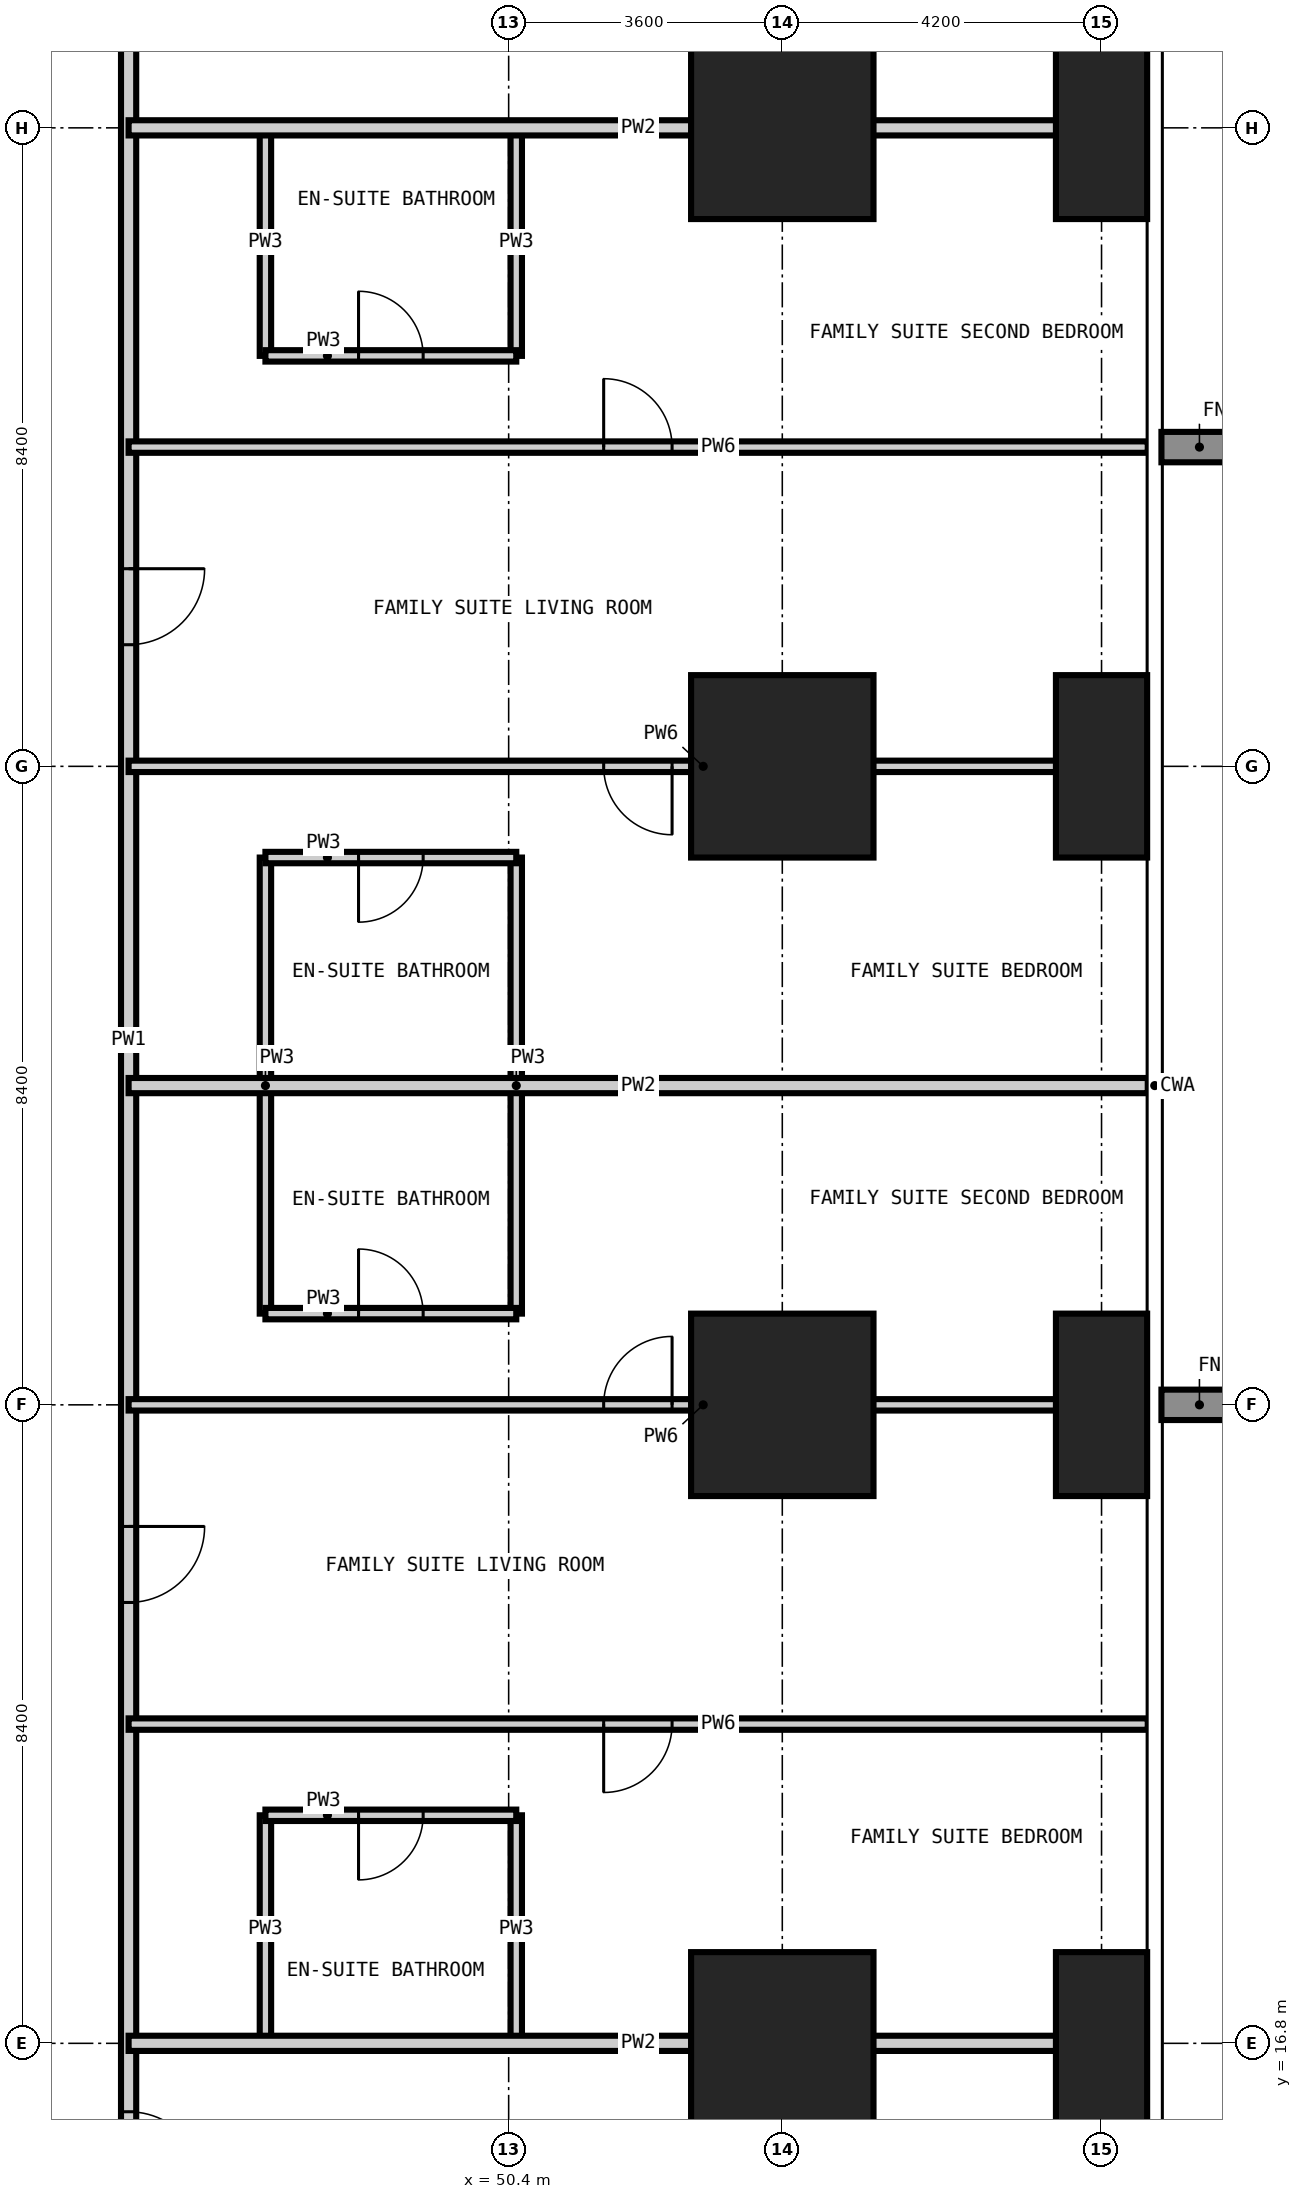
"""IFC4 building model, lengths in metres.
Left out: names, types, materials, properties, quantities, classifications, styles, units other than length and angle.
Written with IfcOpenShell. Run it as: python <this file> out.ifc"""

import sys

from ifc_helpers import new_model, si_unit, direction, frame, frame_2d, origin, origin_2d, place, context, subcontext, project, spatial, rectangle, extrude, element, fill, save


model = new_model("IFC4")
c1 = context("Model", 3, precision=1e-05, world=origin(), true_north=direction((0.0, 1.0)))
c2 = subcontext(c1, "Body", "Model", "MODEL_VIEW")
j1 = project(units=[si_unit("LENGTHUNIT", "METRE"), si_unit("PLANEANGLEUNIT", "RADIAN")], contexts=[c1])
p1 = place(None, origin())
s1 = spatial("IfcSite", under=j1, at=p1, CompositionType="ELEMENT")
p2 = place(p1, origin())
s2 = spatial("IfcBuilding", under=s1, at=p2, CompositionType="ELEMENT")
p3 = place(p2, frame((0.0, 0.0, 81.0)))
s3 = spatial("IfcBuildingStorey", under=s2, at=p3, CompositionType="ELEMENT", Elevation=81.0)
for number, where, z_axis, x_axis in (
    (1, (54.0, 16.8, -0.35), (0.0, 0.0, 1.0), (1.0, 0.0, 0.0)),
    (2, (54.0, 25.2, -0.35), (0.0, 0.0, 1.0), (1.0, 0.0, 0.0)),
    (3, (54.0, 33.6, -0.35), (0.0, 0.0, 1.0), (1.0, 0.0, 0.0)),
    (4, (54.0, 42.0, -0.35), (0.0, 0.0, 1.0), (1.0, 0.0, 0.0)),
):
    element("IfcColumn", number, at=place(p3, frame(where, z_axis=z_axis, x_axis=x_axis)), inside=s3, PredefinedType="COLUMN", context=c2, shape_type="SweptSolid", body=[
        extrude(rectangle(XDim=2.4, YDim=2.4, at=origin_2d()), origin(), (0.0, 0.0, 1.0), 3.6),
    ])
for number, where, z_axis, x_axis in (
    (5, (58.2, 16.8, -0.35), (0.0, 0.0, 1.0), (1.0, 0.0, 0.0)),
    (6, (58.2, 25.2, -0.35), (0.0, 0.0, 1.0), (1.0, 0.0, 0.0)),
    (7, (58.2, 33.6, -0.35), (0.0, 0.0, 1.0), (1.0, 0.0, 0.0)),
    (8, (58.2, 42.0, -0.35), (0.0, 0.0, 1.0), (1.0, 0.0, 0.0)),
):
    element("IfcColumn", number, at=place(p3, frame(where, z_axis=z_axis, x_axis=x_axis)), inside=s3, PredefinedType="COLUMN", context=c2, shape_type="SweptSolid", body=[
        extrude(rectangle(XDim=1.2, YDim=2.4, at=origin_2d()), origin(), (0.0, 0.0, 1.0), 3.6),
    ])
p4 = place(p3, frame((47.2, 16.8, 0.0), z_axis=(0.0, 0.0, 1.0), x_axis=(0.0, 1.0, 0.0)))
e9 = element("IfcWall", 9, at=p4, inside=s3, PredefinedType="PARTITIONING", context=c2, shape_type="SweptSolid", body=[
    extrude(rectangle(XDim=3.0, YDim=0.15, at=frame_2d((1.5, 0.0))), origin(), (0.0, 0.0, 1.0), 3.25),
])
p5 = place(p3, frame((47.2, 26.4, 0.0), z_axis=(0.0, 0.0, 1.0), x_axis=(0.0, 1.0, 0.0)))
e10 = element("IfcWall", 10, at=p5, inside=s3, PredefinedType="PARTITIONING", context=c2, shape_type="SweptSolid", body=[
    extrude(rectangle(XDim=6.0, YDim=0.15, at=frame_2d((3.0, 0.0))), origin(), (0.0, 0.0, 1.0), 3.25),
])
for number, where, z_axis, x_axis in (
    (11, (47.2, 39.0, 0.0), (0.0, 0.0, 1.0), (0.0, 1.0, 0.0)),
    (12, (50.5, 16.8, 0.0), (0.0, 0.0, 1.0), (0.0, 1.0, 0.0)),
):
    element("IfcWall", number, at=place(p3, frame(where, z_axis=z_axis, x_axis=x_axis)), inside=s3, PredefinedType="PARTITIONING", context=c2, shape_type="SweptSolid", body=[
        extrude(rectangle(XDim=3.0, YDim=0.15, at=frame_2d((1.5, 0.0))), origin(), (0.0, 0.0, 1.0), 3.25),
    ])
p6 = place(p3, frame((50.5, 26.4, 0.0), z_axis=(0.0, 0.0, 1.0), x_axis=(0.0, 1.0, 0.0)))
e13 = element("IfcWall", 13, at=p6, inside=s3, PredefinedType="PARTITIONING", context=c2, shape_type="SweptSolid", body=[
    extrude(rectangle(XDim=6.0, YDim=0.15, at=frame_2d((3.0, 0.0))), origin(), (0.0, 0.0, 1.0), 3.25),
])
p7 = place(p3, frame((50.5, 39.0, 0.0), z_axis=(0.0, 0.0, 1.0), x_axis=(0.0, 1.0, 0.0)))
e14 = element("IfcWall", 14, at=p7, inside=s3, PredefinedType="PARTITIONING", context=c2, shape_type="SweptSolid", body=[
    extrude(rectangle(XDim=3.0, YDim=0.15, at=frame_2d((1.5, 0.0))), origin(), (0.0, 0.0, 1.0), 3.25),
])
p8 = place(p3, frame((47.2, 19.8, 0.0), z_axis=(0.0, 0.0, 1.0), x_axis=(1.0, 0.0, 0.0)))
e15 = element("IfcWall", 15, at=p8, inside=s3, PredefinedType="PARTITIONING", context=c2, shape_type="SweptSolid", body=[
    extrude(rectangle(XDim=3.3, YDim=0.15, at=frame_2d((1.65, 0.0))), origin(), (0.0, 0.0, 1.0), 3.25),
])
p9 = place(p8, frame((1.225, 0.0, 0.0)))
e16 = element("IfcOpeningElement", 16, at=p9, cuts=e15, PredefinedType="OPENING", context=c2, shape_type="SweptSolid", body=[
    extrude(rectangle(XDim=0.85, YDim=2.1, at=frame_2d((0.425, 1.05))), frame((0.0, 0.085, 0.0), z_axis=(0.0, -1.0, 0.0), x_axis=(1.0, 0.0, 0.0)), (0.0, 0.0, 1.0), 0.17),
])
p10 = place(p3, frame((47.2, 26.4, 0.0), z_axis=(0.0, 0.0, 1.0), x_axis=(1.0, 0.0, 0.0)))
e17 = element("IfcWall", 17, at=p10, inside=s3, PredefinedType="PARTITIONING", context=c2, shape_type="SweptSolid", body=[
    extrude(rectangle(XDim=3.3, YDim=0.15, at=frame_2d((1.65, 0.0))), origin(), (0.0, 0.0, 1.0), 3.25),
])
p11 = place(p10, frame((1.225, 0.0, 0.0)))
e18 = element("IfcOpeningElement", 18, at=p11, cuts=e17, PredefinedType="OPENING", context=c2, shape_type="SweptSolid", body=[
    extrude(rectangle(XDim=0.85, YDim=2.1, at=frame_2d((0.425, 1.05))), frame((0.0, 0.085, 0.0), z_axis=(0.0, -1.0, 0.0), x_axis=(1.0, 0.0, 0.0)), (0.0, 0.0, 1.0), 0.17),
])
p12 = place(p3, frame((47.2, 32.4, 0.0), z_axis=(0.0, 0.0, 1.0), x_axis=(1.0, 0.0, 0.0)))
e19 = element("IfcWall", 19, at=p12, inside=s3, PredefinedType="PARTITIONING", context=c2, shape_type="SweptSolid", body=[
    extrude(rectangle(XDim=3.3, YDim=0.15, at=frame_2d((1.65, 0.0))), origin(), (0.0, 0.0, 1.0), 3.25),
])
p13 = place(p12, frame((1.225, 0.0, 0.0)))
e20 = element("IfcOpeningElement", 20, at=p13, cuts=e19, PredefinedType="OPENING", context=c2, shape_type="SweptSolid", body=[
    extrude(rectangle(XDim=0.85, YDim=2.1, at=frame_2d((0.425, 1.05))), frame((0.0, 0.085, 0.0), z_axis=(0.0, -1.0, 0.0), x_axis=(1.0, 0.0, 0.0)), (0.0, 0.0, 1.0), 0.17),
])
p14 = place(p3, frame((47.2, 39.0, 0.0), z_axis=(0.0, 0.0, 1.0), x_axis=(1.0, 0.0, 0.0)))
e21 = element("IfcWall", 21, at=p14, inside=s3, PredefinedType="PARTITIONING", context=c2, shape_type="SweptSolid", body=[
    extrude(rectangle(XDim=3.3, YDim=0.15, at=frame_2d((1.65, 0.0))), origin(), (0.0, 0.0, 1.0), 3.25),
])
p15 = place(p14, frame((1.225, 0.0, 0.0)))
e22 = element("IfcOpeningElement", 22, at=p15, cuts=e21, PredefinedType="OPENING", context=c2, shape_type="SweptSolid", body=[
    extrude(rectangle(XDim=0.85, YDim=2.1, at=frame_2d((0.425, 1.05))), frame((0.0, 0.085, 0.0), z_axis=(0.0, -1.0, 0.0), x_axis=(1.0, 0.0, 0.0)), (0.0, 0.0, 1.0), 0.17),
])
p16 = place(p3, frame((45.4, 46.0, 0.0), z_axis=(0.0, 0.0, 1.0), x_axis=(0.0, -1.0, 0.0)))
e23 = element("IfcWall", 23, at=p16, inside=s3, PredefinedType="PARTITIONING", context=c2, shape_type="SweptSolid", body=[
    extrude(rectangle(XDim=32.0, YDim=0.2, at=frame_2d((16.0, 0.0))), origin(), (0.0, 0.0, 1.0), 3.25),
])
p17 = place(p16, frame((22.4, 0.0, 0.0)))
e24 = element("IfcOpeningElement", 24, at=p17, cuts=e23, PredefinedType="OPENING", context=c2, shape_type="SweptSolid", body=[
    extrude(rectangle(XDim=1.0, YDim=2.2, at=frame_2d((0.5, 1.1))), frame((0.0, 0.11, 0.0), z_axis=(0.0, -1.0, 0.0), x_axis=(1.0, 0.0, 0.0)), (0.0, 0.0, 1.0), 0.22),
])
p18 = place(p16, frame((9.8, 0.0, 0.0)))
e25 = element("IfcOpeningElement", 25, at=p18, cuts=e23, PredefinedType="OPENING", context=c2, shape_type="SweptSolid", body=[
    extrude(rectangle(XDim=1.0, YDim=2.2, at=frame_2d((0.5, 1.1))), frame((0.0, 0.11, 0.0), z_axis=(0.0, -1.0, 0.0), x_axis=(1.0, 0.0, 0.0)), (0.0, 0.0, 1.0), 0.22),
])
p19 = place(p16, frame((30.1, 0.0, 0.0)))
e26 = element("IfcOpeningElement", 26, at=p19, cuts=e23, PredefinedType="OPENING", context=c2, shape_type="SweptSolid", body=[
    extrude(rectangle(XDim=1.0, YDim=2.2, at=frame_2d((0.5, 1.1))), frame((0.0, 0.11, 0.0), z_axis=(0.0, -1.0, 0.0), x_axis=(1.0, 0.0, 0.0)), (0.0, 0.0, 1.0), 0.22),
])
p20 = place(p16, frame((1.5, 0.0, 0.0)))
e27 = element("IfcOpeningElement", 27, at=p20, cuts=e23, PredefinedType="OPENING", context=c2, shape_type="SweptSolid", body=[
    extrude(rectangle(XDim=1.0, YDim=2.2, at=frame_2d((0.5, 1.1))), frame((0.0, 0.11, 0.0), z_axis=(0.0, -1.0, 0.0), x_axis=(1.0, 0.0, 0.0)), (0.0, 0.0, 1.0), 0.22),
])
for number, where, z_axis, x_axis in (
    (28, (45.4, 16.8, 0.0), (0.0, 0.0, 1.0), (1.0, 0.0, 0.0)),
    (29, (45.4, 29.4, 0.0), (0.0, 0.0, 1.0), (1.0, 0.0, 0.0)),
    (30, (45.4, 42.0, 0.0), (0.0, 0.0, 1.0), (1.0, 0.0, 0.0)),
):
    element("IfcWall", number, at=place(p3, frame(where, z_axis=z_axis, x_axis=x_axis)), inside=s3, PredefinedType="PARTITIONING", context=c2, shape_type="SweptSolid", body=[
        extrude(rectangle(XDim=13.408, YDim=0.2, at=frame_2d((6.704, 0.0))), origin(), (0.0, 0.0, 1.0), 3.25),
    ])
p21 = place(p3, frame((45.4, 21.0, 0.0), z_axis=(0.0, 0.0, 1.0), x_axis=(1.0, 0.0, 0.0)))
e31 = element("IfcWall", 31, at=p21, inside=s3, PredefinedType="PARTITIONING", context=c2, shape_type="SweptSolid", body=[
    extrude(rectangle(XDim=13.408, YDim=0.15, at=frame_2d((6.704, 0.0))), origin(), (0.0, 0.0, 1.0), 3.25),
])
p22 = place(p21, frame((6.25, 0.0, 0.0)))
e32 = element("IfcOpeningElement", 32, at=p22, cuts=e31, PredefinedType="OPENING", context=c2, shape_type="SweptSolid", body=[
    extrude(rectangle(XDim=0.9, YDim=2.1, at=frame_2d((0.45, 1.05))), frame((0.0, 0.085, 0.0), z_axis=(0.0, -1.0, 0.0), x_axis=(1.0, 0.0, 0.0)), (0.0, 0.0, 1.0), 0.17),
])
p23 = place(p3, frame((45.4, 25.2, 0.0), z_axis=(0.0, 0.0, 1.0), x_axis=(1.0, 0.0, 0.0)))
e33 = element("IfcWall", 33, at=p23, inside=s3, PredefinedType="PARTITIONING", context=c2, shape_type="SweptSolid", body=[
    extrude(rectangle(XDim=13.408, YDim=0.15, at=frame_2d((6.704, 0.0))), origin(), (0.0, 0.0, 1.0), 3.25),
])
p24 = place(p23, frame((6.25, 0.0, 0.0)))
e34 = element("IfcOpeningElement", 34, at=p24, cuts=e33, PredefinedType="OPENING", context=c2, shape_type="SweptSolid", body=[
    extrude(rectangle(XDim=0.9, YDim=2.1, at=frame_2d((0.45, 1.05))), frame((0.0, 0.085, 0.0), z_axis=(0.0, -1.0, 0.0), x_axis=(1.0, 0.0, 0.0)), (0.0, 0.0, 1.0), 0.17),
])
p25 = place(p3, frame((45.4, 33.6, 0.0), z_axis=(0.0, 0.0, 1.0), x_axis=(1.0, 0.0, 0.0)))
e35 = element("IfcWall", 35, at=p25, inside=s3, PredefinedType="PARTITIONING", context=c2, shape_type="SweptSolid", body=[
    extrude(rectangle(XDim=13.408, YDim=0.15, at=frame_2d((6.704, 0.0))), origin(), (0.0, 0.0, 1.0), 3.25),
])
p26 = place(p25, frame((6.25, 0.0, 0.0)))
e36 = element("IfcOpeningElement", 36, at=p26, cuts=e35, PredefinedType="OPENING", context=c2, shape_type="SweptSolid", body=[
    extrude(rectangle(XDim=0.9, YDim=2.1, at=frame_2d((0.45, 1.05))), frame((0.0, 0.085, 0.0), z_axis=(0.0, -1.0, 0.0), x_axis=(1.0, 0.0, 0.0)), (0.0, 0.0, 1.0), 0.17),
])
p27 = place(p3, frame((45.4, 37.8, 0.0), z_axis=(0.0, 0.0, 1.0), x_axis=(1.0, 0.0, 0.0)))
e37 = element("IfcWall", 37, at=p27, inside=s3, PredefinedType="PARTITIONING", context=c2, shape_type="SweptSolid", body=[
    extrude(rectangle(XDim=13.408, YDim=0.15, at=frame_2d((6.704, 0.0))), origin(), (0.0, 0.0, 1.0), 3.25),
])
p28 = place(p27, frame((6.25, 0.0, 0.0)))
e38 = element("IfcOpeningElement", 38, at=p28, cuts=e37, PredefinedType="OPENING", context=c2, shape_type="SweptSolid", body=[
    extrude(rectangle(XDim=0.9, YDim=2.1, at=frame_2d((0.45, 1.05))), frame((0.0, 0.085, 0.0), z_axis=(0.0, -1.0, 0.0), x_axis=(1.0, 0.0, 0.0)), (0.0, 0.0, 1.0), 0.17),
])
p29 = place(p17, origin())
e39 = element("IfcDoor", 39, at=p29, inside=s3, OperationType="SINGLE_SWING_LEFT", PredefinedType="DOOR", context=c2, shape_type="SweptSolid", body=[
    extrude(rectangle(XDim=1.0, YDim=2.2, at=frame_2d((0.5, 1.1))), frame((0.0, 0.025, 0.0), z_axis=(0.0, -1.0, 0.0), x_axis=(1.0, 0.0, 0.0)), (0.0, 0.0, 1.0), 0.05),
])
fill(e24, e39)
p30 = place(p22, frame((0.9, 0.0, 0.0), z_axis=(0.0, 0.0, 1.0), x_axis=(-1.0, 0.0, 0.0)))
e40 = element("IfcDoor", 40, at=p30, inside=s3, OperationType="SINGLE_SWING_RIGHT", PredefinedType="DOOR", context=c2, shape_type="SweptSolid", body=[
    extrude(rectangle(XDim=0.9, YDim=2.1, at=frame_2d((0.45, 1.05))), frame((0.0, 0.025, 0.0), z_axis=(0.0, -1.0, 0.0), x_axis=(1.0, 0.0, 0.0)), (0.0, 0.0, 1.0), 0.05),
])
fill(e32, e40)
p31 = place(p9, frame((0.85, 0.0, 0.0), z_axis=(0.0, 0.0, 1.0), x_axis=(-1.0, 0.0, 0.0)))
e41 = element("IfcDoor", 41, at=p31, inside=s3, OperationType="SINGLE_SWING_RIGHT", PredefinedType="DOOR", context=c2, shape_type="SweptSolid", body=[
    extrude(rectangle(XDim=0.85, YDim=2.1, at=frame_2d((0.425, 1.05))), frame((0.0, 0.025, 0.0), z_axis=(0.0, -1.0, 0.0), x_axis=(1.0, 0.0, 0.0)), (0.0, 0.0, 1.0), 0.05),
])
fill(e16, e41)
p32 = place(p24, origin())
e42 = element("IfcDoor", 42, at=p32, inside=s3, OperationType="SINGLE_SWING_RIGHT", PredefinedType="DOOR", context=c2, shape_type="SweptSolid", body=[
    extrude(rectangle(XDim=0.9, YDim=2.1, at=frame_2d((0.45, 1.05))), frame((0.0, 0.025, 0.0), z_axis=(0.0, -1.0, 0.0), x_axis=(1.0, 0.0, 0.0)), (0.0, 0.0, 1.0), 0.05),
])
fill(e34, e42)
p33 = place(p11, origin())
e43 = element("IfcDoor", 43, at=p33, inside=s3, OperationType="SINGLE_SWING_LEFT", PredefinedType="DOOR", context=c2, shape_type="SweptSolid", body=[
    extrude(rectangle(XDim=0.85, YDim=2.1, at=frame_2d((0.425, 1.05))), frame((0.0, 0.025, 0.0), z_axis=(0.0, -1.0, 0.0), x_axis=(1.0, 0.0, 0.0)), (0.0, 0.0, 1.0), 0.05),
])
fill(e18, e43)
p34 = place(p18, origin())
e44 = element("IfcDoor", 44, at=p34, inside=s3, OperationType="SINGLE_SWING_LEFT", PredefinedType="DOOR", context=c2, shape_type="SweptSolid", body=[
    extrude(rectangle(XDim=1.0, YDim=2.2, at=frame_2d((0.5, 1.1))), frame((0.0, 0.025, 0.0), z_axis=(0.0, -1.0, 0.0), x_axis=(1.0, 0.0, 0.0)), (0.0, 0.0, 1.0), 0.05),
])
fill(e25, e44)
p35 = place(p26, frame((0.9, 0.0, 0.0), z_axis=(0.0, 0.0, 1.0), x_axis=(-1.0, 0.0, 0.0)))
e45 = element("IfcDoor", 45, at=p35, inside=s3, OperationType="SINGLE_SWING_LEFT", PredefinedType="DOOR", context=c2, shape_type="SweptSolid", body=[
    extrude(rectangle(XDim=0.9, YDim=2.1, at=frame_2d((0.45, 1.05))), frame((0.0, 0.025, 0.0), z_axis=(0.0, -1.0, 0.0), x_axis=(1.0, 0.0, 0.0)), (0.0, 0.0, 1.0), 0.05),
])
fill(e36, e45)
p36 = place(p13, frame((0.85, 0.0, 0.0), z_axis=(0.0, 0.0, 1.0), x_axis=(-1.0, 0.0, 0.0)))
e46 = element("IfcDoor", 46, at=p36, inside=s3, OperationType="SINGLE_SWING_RIGHT", PredefinedType="DOOR", context=c2, shape_type="SweptSolid", body=[
    extrude(rectangle(XDim=0.85, YDim=2.1, at=frame_2d((0.425, 1.05))), frame((0.0, 0.025, 0.0), z_axis=(0.0, -1.0, 0.0), x_axis=(1.0, 0.0, 0.0)), (0.0, 0.0, 1.0), 0.05),
])
fill(e20, e46)
p37 = place(p28, origin())
e47 = element("IfcDoor", 47, at=p37, inside=s3, OperationType="SINGLE_SWING_LEFT", PredefinedType="DOOR", context=c2, shape_type="SweptSolid", body=[
    extrude(rectangle(XDim=0.9, YDim=2.1, at=frame_2d((0.45, 1.05))), frame((0.0, 0.025, 0.0), z_axis=(0.0, -1.0, 0.0), x_axis=(1.0, 0.0, 0.0)), (0.0, 0.0, 1.0), 0.05),
])
fill(e38, e47)
p38 = place(p15, origin())
e48 = element("IfcDoor", 48, at=p38, inside=s3, OperationType="SINGLE_SWING_LEFT", PredefinedType="DOOR", context=c2, shape_type="SweptSolid", body=[
    extrude(rectangle(XDim=0.85, YDim=2.1, at=frame_2d((0.425, 1.05))), frame((0.0, 0.025, 0.0), z_axis=(0.0, -1.0, 0.0), x_axis=(1.0, 0.0, 0.0)), (0.0, 0.0, 1.0), 0.05),
])
fill(e22, e48)
p39 = place(p19, origin())
e49 = element("IfcDoor", 49, at=p39, inside=s3, OperationType="SINGLE_SWING_RIGHT", PredefinedType="DOOR", context=c2, shape_type="SweptSolid", body=[
    extrude(rectangle(XDim=1.0, YDim=2.2, at=frame_2d((0.5, 1.1))), frame((0.0, 0.025, 0.0), z_axis=(0.0, -1.0, 0.0), x_axis=(1.0, 0.0, 0.0)), (0.0, 0.0, 1.0), 0.05),
])
fill(e26, e49)
save(model, sys.argv[1])
